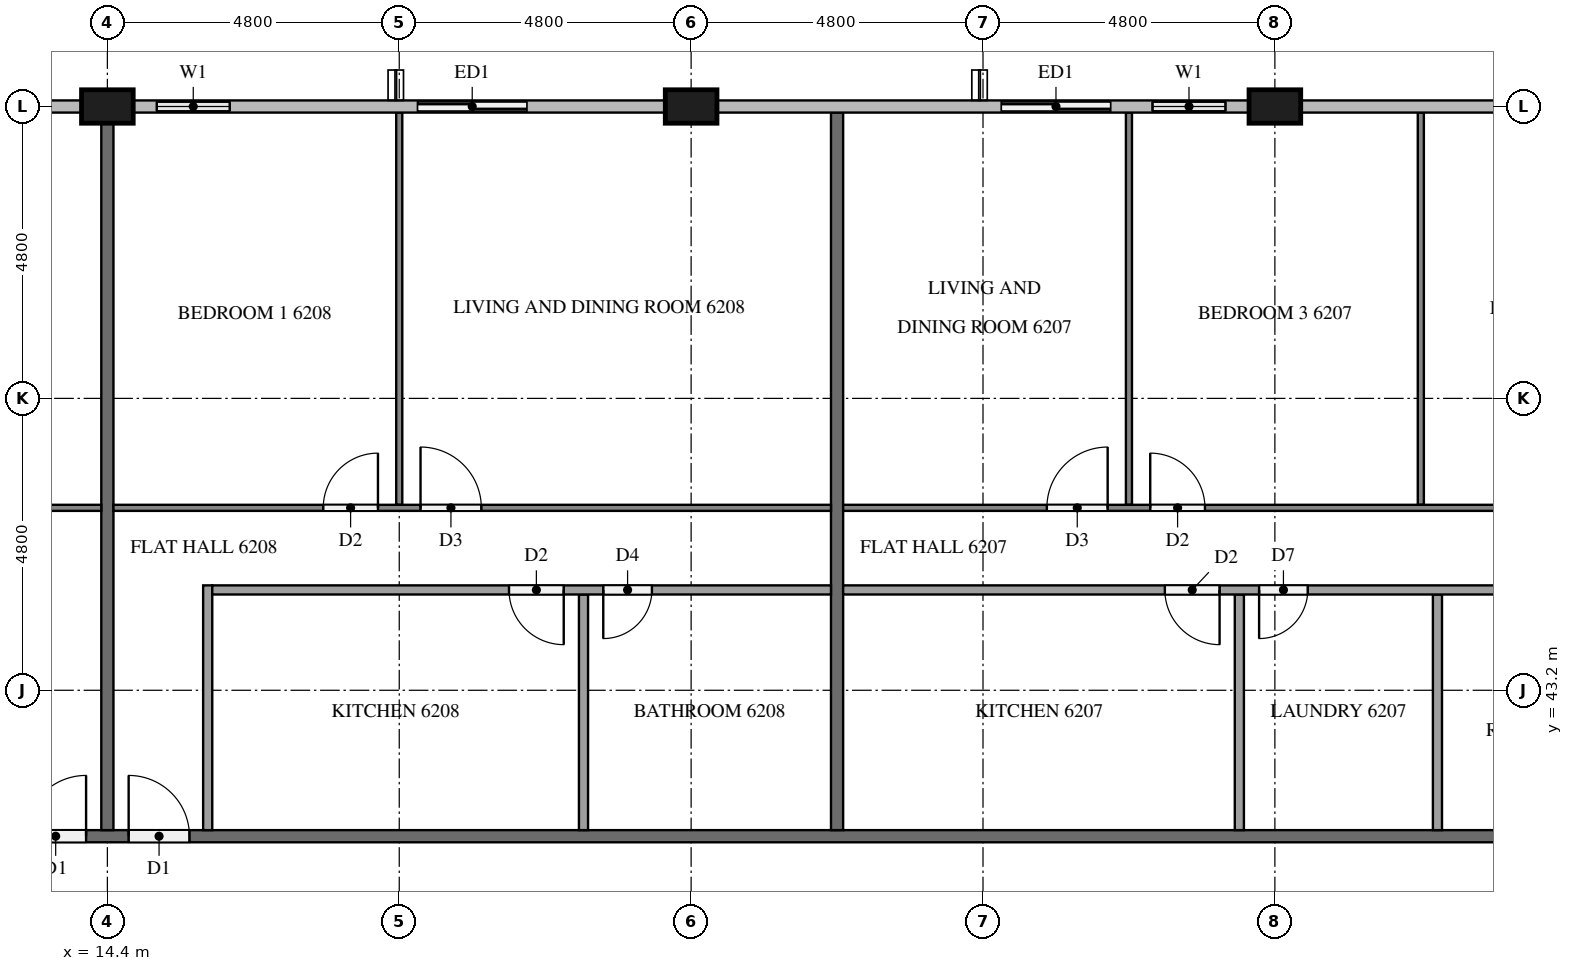
"""IFC4 building model, lengths in metres.
Left out: names, types, materials, properties, quantities, classifications, styles, units other than length and angle.
Written with IfcOpenShell. Run it as: python <this file> out.ifc"""

import sys

from ifc_helpers import new_model, si_unit, direction, frame, frame_2d, origin, origin_2d, place, context, subcontext, project, spatial, rectangle, extrude, element, fill, save


model = new_model("IFC4")
c1 = context("Model", 3, precision=1e-05, world=origin(), true_north=direction((0.0, 1.0)))
c2 = subcontext(c1, "Body", "Model", "MODEL_VIEW")
j1 = project(units=[si_unit("LENGTHUNIT", "METRE"), si_unit("PLANEANGLEUNIT", "RADIAN")], contexts=[c1])
p1 = place(None, origin())
s1 = spatial("IfcSite", under=j1, at=p1, CompositionType="ELEMENT")
p2 = place(p1, origin())
s2 = spatial("IfcBuilding", under=s1, at=p2, CompositionType="ELEMENT")
p3 = place(p2, frame((0.0, 0.0, 238.7)))
s3 = spatial("IfcBuildingStorey", under=s2, at=p3, CompositionType="ELEMENT", Elevation=238.7)
for number, where, z_axis, x_axis in (
    (1, (33.6, 52.8, 0.0), (0.0, 0.0, 1.0), (1.0, 0.0, 0.0)),
    (2, (24.0, 52.8, 0.0), (0.0, 0.0, 1.0), (1.0, 0.0, 0.0)),
    (3, (14.4, 52.8, 0.0), (0.0, 0.0, 1.0), (1.0, 0.0, 0.0)),
):
    element("IfcColumn", number, at=place(p3, frame(where, z_axis=z_axis, x_axis=x_axis)), inside=s3, PredefinedType="COLUMN", context=c2, shape_type="SweptSolid", body=[
        extrude(rectangle(XDim=0.85, YDim=0.55, at=origin_2d()), origin(), (0.0, 0.0, 1.0), 3.2),
    ])
p4 = place(p3, frame((33.175, 52.8, 0.0), z_axis=(0.0, 0.0, 1.0), x_axis=(-1.0, 0.0, 0.0)))
e4 = element("IfcWall", 4, at=p4, inside=s3, PredefinedType="SOLIDWALL", context=c2, shape_type="SweptSolid", body=[
    extrude(rectangle(XDim=4.375, YDim=0.15, at=frame_2d((2.188, 0.0))), origin(), (0.0, 0.0, 1.0), 3.2),
])
p5 = place(p4, frame((0.387, 0.0, 0.9)))
e5 = element("IfcOpeningElement", 5, at=p5, cuts=e4, PredefinedType="OPENING", context=c2, shape_type="SweptSolid", body=[
    extrude(rectangle(XDim=1.2, YDim=1.4, at=frame_2d((0.6, 0.7))), frame((0.0, 0.085, 0.0), z_axis=(0.0, -1.0, 0.0), x_axis=(1.0, 0.0, 0.0)), (0.0, 0.0, 1.0), 0.17),
])
p6 = place(p4, frame((2.275, 0.0, 0.0)))
e6 = element("IfcOpeningElement", 6, at=p6, cuts=e4, PredefinedType="OPENING", context=c2, shape_type="SweptSolid", body=[
    extrude(rectangle(XDim=1.8, YDim=2.4, at=frame_2d((0.9, 1.2))), frame((0.0, 0.085, 0.0), z_axis=(0.0, -1.0, 0.0), x_axis=(1.0, 0.0, 0.0)), (0.0, 0.0, 1.0), 0.17),
])
p7 = place(p3, frame((21.6, 52.8, 0.0), z_axis=(0.0, 0.0, 1.0), x_axis=(-1.0, 0.0, 0.0)))
e7 = element("IfcWall", 7, at=p7, inside=s3, PredefinedType="SOLIDWALL", context=c2, shape_type="SweptSolid", body=[
    extrude(rectangle(XDim=2.4, YDim=0.15, at=frame_2d((1.2, 0.0))), origin(), (0.0, 0.0, 1.0), 3.2),
])
p8 = place(p7, frame((0.3, 0.0, 0.0)))
e8 = element("IfcOpeningElement", 8, at=p8, cuts=e7, PredefinedType="OPENING", context=c2, shape_type="SweptSolid", body=[
    extrude(rectangle(XDim=1.8, YDim=2.4, at=frame_2d((0.9, 1.2))), frame((0.0, 0.085, 0.0), z_axis=(0.0, -1.0, 0.0), x_axis=(1.0, 0.0, 0.0)), (0.0, 0.0, 1.0), 0.17),
])
p9 = place(p3, frame((16.8, 52.8, 0.0), z_axis=(0.0, 0.0, 1.0), x_axis=(-1.0, 0.0, 0.0)))
e9 = element("IfcWall", 9, at=p9, inside=s3, PredefinedType="SOLIDWALL", context=c2, shape_type="SweptSolid", body=[
    extrude(rectangle(XDim=1.975, YDim=0.15, at=frame_2d((0.988, 0.0))), origin(), (0.0, 0.0, 1.0), 3.2),
])
p10 = place(p9, frame((0.387, 0.0, 0.9)))
e10 = element("IfcOpeningElement", 10, at=p10, cuts=e9, PredefinedType="OPENING", context=c2, shape_type="SweptSolid", body=[
    extrude(rectangle(XDim=1.2, YDim=1.4, at=frame_2d((0.6, 0.7))), frame((0.0, 0.085, 0.0), z_axis=(0.0, -1.0, 0.0), x_axis=(1.0, 0.0, 0.0)), (0.0, 0.0, 1.0), 0.17),
])
p11 = place(p3, frame((11.9, 40.8, 0.0), z_axis=(0.0, 0.0, 1.0), x_axis=(1.0, 0.0, 0.0)))
e11 = element("IfcWall", 11, at=p11, inside=s3, PredefinedType="PARTITIONING", context=c2, shape_type="SweptSolid", body=[
    extrude(rectangle(XDim=38.6, YDim=0.2, at=frame_2d((19.3, 0.0))), origin(), (0.0, 0.0, 1.0), 3.2),
])
p12 = place(p11, frame((34.05, 0.0, 0.0)))
e12 = element("IfcOpeningElement", 12, at=p12, cuts=e11, PredefinedType="OPENING", context=c2, shape_type="SweptSolid", body=[
    extrude(rectangle(XDim=1.0, YDim=2.1, at=frame_2d((0.5, 1.05))), frame((0.0, 0.11, 0.0), z_axis=(0.0, -1.0, 0.0), x_axis=(1.0, 0.0, 0.0)), (0.0, 0.0, 1.0), 0.22),
])
p13 = place(p11, frame((32.3, 0.0, 0.0)))
e13 = element("IfcOpeningElement", 13, at=p13, cuts=e11, PredefinedType="OPENING", context=c2, shape_type="SweptSolid", body=[
    extrude(rectangle(XDim=1.1, YDim=2.1, at=frame_2d((0.55, 1.05))), frame((0.0, 0.11, 0.0), z_axis=(0.0, -1.0, 0.0), x_axis=(1.0, 0.0, 0.0)), (0.0, 0.0, 1.0), 0.22),
])
p14 = place(p11, frame((2.85, 0.0, 0.0)))
e14 = element("IfcOpeningElement", 14, at=p14, cuts=e11, PredefinedType="OPENING", context=c2, shape_type="SweptSolid", body=[
    extrude(rectangle(XDim=1.0, YDim=2.1, at=frame_2d((0.5, 1.05))), frame((0.0, 0.11, 0.0), z_axis=(0.0, -1.0, 0.0), x_axis=(1.0, 0.0, 0.0)), (0.0, 0.0, 1.0), 0.22),
])
p15 = place(p11, frame((1.15, 0.0, 0.0)))
e15 = element("IfcOpeningElement", 15, at=p15, cuts=e11, PredefinedType="OPENING", context=c2, shape_type="SweptSolid", body=[
    extrude(rectangle(XDim=1.0, YDim=2.1, at=frame_2d((0.5, 1.05))), frame((0.0, 0.11, 0.0), z_axis=(0.0, -1.0, 0.0), x_axis=(1.0, 0.0, 0.0)), (0.0, 0.0, 1.0), 0.22),
])
p16 = place(p3, frame((26.4, 52.7, 0.0), z_axis=(0.0, 0.0, 1.0), x_axis=(0.0, -1.0, 0.0)))
e16 = element("IfcWall", 16, at=p16, inside=s3, PredefinedType="PARTITIONING", context=c2, shape_type="SweptSolid", body=[
    extrude(rectangle(XDim=11.8, YDim=0.2, at=frame_2d((5.9, 0.0))), origin(), (0.0, 0.0, 1.0), 3.2),
])
p17 = place(p3, frame((14.4, 52.525, 0.0), z_axis=(0.0, 0.0, 1.0), x_axis=(0.0, -1.0, 0.0)))
e17 = element("IfcWall", 17, at=p17, inside=s3, PredefinedType="PARTITIONING", context=c2, shape_type="SweptSolid", body=[
    extrude(rectangle(XDim=11.625, YDim=0.2, at=frame_2d((5.812, 0.0))), origin(), (0.0, 0.0, 1.0), 3.2),
])
for number, where, z_axis, x_axis in (
    (18, (36.0, 46.25, 0.0), (0.0, 0.0, 1.0), (0.0, 1.0, 0.0)),
    (19, (31.2, 46.25, 0.0), (0.0, 0.0, 1.0), (0.0, 1.0, 0.0)),
):
    element("IfcWall", number, at=place(p3, frame(where, z_axis=z_axis, x_axis=x_axis)), inside=s3, PredefinedType="PARTITIONING", context=c2, shape_type="SweptSolid", body=[
        extrude(rectangle(XDim=6.45, YDim=0.1, at=frame_2d((3.225, 0.0))), origin(), (0.0, 0.0, 1.0), 3.2),
    ])
p18 = place(p3, frame((26.5, 46.2, 0.0), z_axis=(0.0, 0.0, 1.0), x_axis=(1.0, 0.0, 0.0)))
e20 = element("IfcWall", 20, at=p18, inside=s3, PredefinedType="PARTITIONING", context=c2, shape_type="SweptSolid", body=[
    extrude(rectangle(XDim=19.0, YDim=0.1, at=frame_2d((9.5, 0.0))), origin(), (0.0, 0.0, 1.0), 3.2),
])
p19 = place(p18, frame((14.65, 0.0, 0.0)))
e21 = element("IfcOpeningElement", 21, at=p19, cuts=e20, PredefinedType="OPENING", context=c2, shape_type="SweptSolid", body=[
    extrude(rectangle(XDim=0.9, YDim=2.1, at=frame_2d((0.45, 1.05))), frame((0.0, 0.06, 0.0), z_axis=(0.0, -1.0, 0.0), x_axis=(1.0, 0.0, 0.0)), (0.0, 0.0, 1.0), 0.12),
])
p20 = place(p18, frame((13.05, 0.0, 0.0)))
e22 = element("IfcOpeningElement", 22, at=p20, cuts=e20, PredefinedType="OPENING", context=c2, shape_type="SweptSolid", body=[
    extrude(rectangle(XDim=0.9, YDim=2.1, at=frame_2d((0.45, 1.05))), frame((0.0, 0.06, 0.0), z_axis=(0.0, -1.0, 0.0), x_axis=(1.0, 0.0, 0.0)), (0.0, 0.0, 1.0), 0.12),
])
p21 = place(p18, frame((5.05, 0.0, 0.0)))
e23 = element("IfcOpeningElement", 23, at=p21, cuts=e20, PredefinedType="OPENING", context=c2, shape_type="SweptSolid", body=[
    extrude(rectangle(XDim=0.9, YDim=2.1, at=frame_2d((0.45, 1.05))), frame((0.0, 0.06, 0.0), z_axis=(0.0, -1.0, 0.0), x_axis=(1.0, 0.0, 0.0)), (0.0, 0.0, 1.0), 0.12),
])
p22 = place(p18, frame((3.35, 0.0, 0.0)))
e24 = element("IfcOpeningElement", 24, at=p22, cuts=e20, PredefinedType="OPENING", context=c2, shape_type="SweptSolid", body=[
    extrude(rectangle(XDim=1.0, YDim=2.1, at=frame_2d((0.5, 1.05))), frame((0.0, 0.06, 0.0), z_axis=(0.0, -1.0, 0.0), x_axis=(1.0, 0.0, 0.0)), (0.0, 0.0, 1.0), 0.12),
])
for number, where, z_axis, x_axis in (
    (25, (36.273, 40.9, 0.0), (0.0, 0.0, 1.0), (0.0, 1.0, 0.0)),
    (26, (33.016, 40.9, 0.0), (0.0, 0.0, 1.0), (0.0, 1.0, 0.0)),
):
    element("IfcWall", number, at=place(p3, frame(where, z_axis=z_axis, x_axis=x_axis)), inside=s3, PredefinedType="PARTITIONING", context=c2, shape_type="SweptSolid", body=[
        extrude(rectangle(XDim=3.875, YDim=0.15, at=frame_2d((1.938, 0.0))), origin(), (0.0, 0.0, 1.0), 3.2),
    ])
p23 = place(p3, frame((43.875, 44.85, 0.0), z_axis=(0.0, 0.0, 1.0), x_axis=(-1.0, 0.0, 0.0)))
e27 = element("IfcWall", 27, at=p23, inside=s3, PredefinedType="PARTITIONING", context=c2, shape_type="SweptSolid", body=[
    extrude(rectangle(XDim=17.375, YDim=0.15, at=frame_2d((8.688, 0.0))), origin(), (0.0, 0.0, 1.0), 3.2),
])
p24 = place(p23, frame((3.119, 0.0, 0.0)))
e28 = element("IfcOpeningElement", 28, at=p24, cuts=e27, PredefinedType="OPENING", context=c2, shape_type="SweptSolid", body=[
    extrude(rectangle(XDim=0.9, YDim=2.1, at=frame_2d((0.45, 1.05))), frame((0.0, 0.085, 0.0), z_axis=(0.0, -1.0, 0.0), x_axis=(1.0, 0.0, 0.0)), (0.0, 0.0, 1.0), 0.17),
])
p25 = place(p23, frame((4.669, 0.0, 0.0)))
e29 = element("IfcOpeningElement", 29, at=p25, cuts=e27, PredefinedType="OPENING", context=c2, shape_type="SweptSolid", body=[
    extrude(rectangle(XDim=0.8, YDim=2.1, at=frame_2d((0.4, 1.05))), frame((0.0, 0.085, 0.0), z_axis=(0.0, -1.0, 0.0), x_axis=(1.0, 0.0, 0.0)), (0.0, 0.0, 1.0), 0.17),
])
p26 = place(p23, frame((9.734, 0.0, 0.0)))
e30 = element("IfcOpeningElement", 30, at=p26, cuts=e27, PredefinedType="OPENING", context=c2, shape_type="SweptSolid", body=[
    extrude(rectangle(XDim=0.8, YDim=2.1, at=frame_2d((0.4, 1.05))), frame((0.0, 0.085, 0.0), z_axis=(0.0, -1.0, 0.0), x_axis=(1.0, 0.0, 0.0)), (0.0, 0.0, 1.0), 0.17),
])
p27 = place(p23, frame((11.184, 0.0, 0.0)))
e31 = element("IfcOpeningElement", 31, at=p27, cuts=e27, PredefinedType="OPENING", context=c2, shape_type="SweptSolid", body=[
    extrude(rectangle(XDim=0.9, YDim=2.1, at=frame_2d((0.45, 1.05))), frame((0.0, 0.085, 0.0), z_axis=(0.0, -1.0, 0.0), x_axis=(1.0, 0.0, 0.0)), (0.0, 0.0, 1.0), 0.17),
])
p28 = place(p3, frame((19.2, 46.25, 0.0), z_axis=(0.0, 0.0, 1.0), x_axis=(0.0, 1.0, 0.0)))
e32 = element("IfcWall", 32, at=p28, inside=s3, PredefinedType="PARTITIONING", context=c2, shape_type="SweptSolid", body=[
    extrude(rectangle(XDim=6.45, YDim=0.1, at=frame_2d((3.225, 0.0))), origin(), (0.0, 0.0, 1.0), 3.2),
])
p29 = place(p3, frame((14.5, 46.2, 0.0), z_axis=(0.0, 0.0, 1.0), x_axis=(1.0, 0.0, 0.0)))
e33 = element("IfcWall", 33, at=p29, inside=s3, PredefinedType="PARTITIONING", context=c2, shape_type="SweptSolid", body=[
    extrude(rectangle(XDim=11.8, YDim=0.1, at=frame_2d((5.9, 0.0))), origin(), (0.0, 0.0, 1.0), 3.2),
])
p30 = place(p29, frame((3.45, 0.0, 0.0)))
e34 = element("IfcOpeningElement", 34, at=p30, cuts=e33, PredefinedType="OPENING", context=c2, shape_type="SweptSolid", body=[
    extrude(rectangle(XDim=0.9, YDim=2.1, at=frame_2d((0.45, 1.05))), frame((0.0, 0.06, 0.0), z_axis=(0.0, -1.0, 0.0), x_axis=(1.0, 0.0, 0.0)), (0.0, 0.0, 1.0), 0.12),
])
p31 = place(p29, frame((5.05, 0.0, 0.0)))
e35 = element("IfcOpeningElement", 35, at=p31, cuts=e33, PredefinedType="OPENING", context=c2, shape_type="SweptSolid", body=[
    extrude(rectangle(XDim=1.0, YDim=2.1, at=frame_2d((0.5, 1.05))), frame((0.0, 0.06, 0.0), z_axis=(0.0, -1.0, 0.0), x_axis=(1.0, 0.0, 0.0)), (0.0, 0.0, 1.0), 0.12),
])
p32 = place(p3, frame((22.23, 40.9, 0.0), z_axis=(0.0, 0.0, 1.0), x_axis=(0.0, 1.0, 0.0)))
e36 = element("IfcWall", 36, at=p32, inside=s3, PredefinedType="PARTITIONING", context=c2, shape_type="SweptSolid", body=[
    extrude(rectangle(XDim=3.875, YDim=0.15, at=frame_2d((1.938, 0.0))), origin(), (0.0, 0.0, 1.0), 3.2),
])
p33 = place(p3, frame((16.05, 40.9, 0.0), z_axis=(0.0, 0.0, 1.0), x_axis=(0.0, 1.0, 0.0)))
e37 = element("IfcWall", 37, at=p33, inside=s3, PredefinedType="PARTITIONING", context=c2, shape_type="SweptSolid", body=[
    extrude(rectangle(XDim=4.025, YDim=0.15, at=frame_2d((2.013, 0.0))), origin(), (0.0, 0.0, 1.0), 3.2),
])
p34 = place(p3, frame((26.3, 44.85, 0.0), z_axis=(0.0, 0.0, 1.0), x_axis=(-1.0, 0.0, 0.0)))
e38 = element("IfcWall", 38, at=p34, inside=s3, PredefinedType="PARTITIONING", context=c2, shape_type="SweptSolid", body=[
    extrude(rectangle(XDim=10.175, YDim=0.15, at=frame_2d((5.087, 0.0))), origin(), (0.0, 0.0, 1.0), 3.2),
])
p35 = place(p34, frame((4.395, 0.0, 0.0)))
e39 = element("IfcOpeningElement", 39, at=p35, cuts=e38, PredefinedType="OPENING", context=c2, shape_type="SweptSolid", body=[
    extrude(rectangle(XDim=0.9, YDim=2.1, at=frame_2d((0.45, 1.05))), frame((0.0, 0.085, 0.0), z_axis=(0.0, -1.0, 0.0), x_axis=(1.0, 0.0, 0.0)), (0.0, 0.0, 1.0), 0.17),
])
p36 = place(p34, frame((2.945, 0.0, 0.0)))
e40 = element("IfcOpeningElement", 40, at=p36, cuts=e38, PredefinedType="OPENING", context=c2, shape_type="SweptSolid", body=[
    extrude(rectangle(XDim=0.8, YDim=2.1, at=frame_2d((0.4, 1.05))), frame((0.0, 0.085, 0.0), z_axis=(0.0, -1.0, 0.0), x_axis=(1.0, 0.0, 0.0)), (0.0, 0.0, 1.0), 0.17),
])
p37 = place(p3, frame((0.1, 46.2, 0.0), z_axis=(0.0, 0.0, 1.0), x_axis=(1.0, 0.0, 0.0)))
e41 = element("IfcWall", 41, at=p37, inside=s3, PredefinedType="PARTITIONING", context=c2, shape_type="SweptSolid", body=[
    extrude(rectangle(XDim=14.2, YDim=0.1, at=frame_2d((7.1, 0.0))), origin(), (0.0, 0.0, 1.0), 3.2),
])
p38 = place(p37, frame((9.85, 0.0, 0.0)))
e42 = element("IfcOpeningElement", 42, at=p38, cuts=e41, PredefinedType="OPENING", context=c2, shape_type="SweptSolid", body=[
    extrude(rectangle(XDim=1.0, YDim=2.1, at=frame_2d((0.5, 1.05))), frame((0.0, 0.06, 0.0), z_axis=(0.0, -1.0, 0.0), x_axis=(1.0, 0.0, 0.0)), (0.0, 0.0, 1.0), 0.12),
])
p39 = place(p37, frame((8.25, 0.0, 0.0)))
e43 = element("IfcOpeningElement", 43, at=p39, cuts=e41, PredefinedType="OPENING", context=c2, shape_type="SweptSolid", body=[
    extrude(rectangle(XDim=0.9, YDim=2.1, at=frame_2d((0.45, 1.05))), frame((0.0, 0.06, 0.0), z_axis=(0.0, -1.0, 0.0), x_axis=(1.0, 0.0, 0.0)), (0.0, 0.0, 1.0), 0.12),
])
p40 = place(p37, frame((0.3, 0.0, 0.0)))
e44 = element("IfcOpeningElement", 44, at=p40, cuts=e41, PredefinedType="OPENING", context=c2, shape_type="SweptSolid", body=[
    extrude(rectangle(XDim=0.9, YDim=2.1, at=frame_2d((0.45, 1.05))), frame((0.0, 0.06, 0.0), z_axis=(0.0, -1.0, 0.0), x_axis=(1.0, 0.0, 0.0)), (0.0, 0.0, 1.0), 0.12),
])
p41 = place(p5, origin())
e45 = element("IfcWindow", 45, at=p41, inside=s3, PartitioningType="SINGLE_PANEL", PredefinedType="WINDOW", context=c2, shape_type="SweptSolid", body=[
    extrude(rectangle(XDim=1.2, YDim=1.4, at=frame_2d((0.6, 0.7))), frame((0.0, 0.03, 0.0), z_axis=(0.0, -1.0, 0.0), x_axis=(1.0, 0.0, 0.0)), (0.0, 0.0, 1.0), 0.06),
])
fill(e5, e45)
p42 = place(p6, origin())
e46 = element("IfcDoor", 46, at=p42, inside=s3, OperationType="SLIDING_TO_RIGHT", PredefinedType="DOOR", context=c2, shape_type="SweptSolid", body=[
    extrude(rectangle(XDim=1.8, YDim=2.4, at=frame_2d((0.9, 1.2))), frame((0.0, 0.025, 0.0), z_axis=(0.0, -1.0, 0.0), x_axis=(1.0, 0.0, 0.0)), (0.0, 0.0, 1.0), 0.05),
])
fill(e6, e46)
p43 = place(p8, origin())
e47 = element("IfcDoor", 47, at=p43, inside=s3, OperationType="SLIDING_TO_LEFT", PredefinedType="DOOR", context=c2, shape_type="SweptSolid", body=[
    extrude(rectangle(XDim=1.8, YDim=2.4, at=frame_2d((0.9, 1.2))), frame((0.0, 0.025, 0.0), z_axis=(0.0, -1.0, 0.0), x_axis=(1.0, 0.0, 0.0)), (0.0, 0.0, 1.0), 0.05),
])
fill(e8, e47)
p44 = place(p10, origin())
e48 = element("IfcWindow", 48, at=p44, inside=s3, PartitioningType="SINGLE_PANEL", PredefinedType="WINDOW", context=c2, shape_type="SweptSolid", body=[
    extrude(rectangle(XDim=1.2, YDim=1.4, at=frame_2d((0.6, 0.7))), frame((0.0, 0.03, 0.0), z_axis=(0.0, -1.0, 0.0), x_axis=(1.0, 0.0, 0.0)), (0.0, 0.0, 1.0), 0.06),
])
fill(e10, e48)
p45 = place(p14, origin())
e49 = element("IfcDoor", 49, at=p45, inside=s3, OperationType="SINGLE_SWING_LEFT", PredefinedType="DOOR", context=c2, shape_type="SweptSolid", body=[
    extrude(rectangle(XDim=1.0, YDim=2.1, at=frame_2d((0.5, 1.05))), frame((0.0, 0.025, 0.0), z_axis=(0.0, -1.0, 0.0), x_axis=(1.0, 0.0, 0.0)), (0.0, 0.0, 1.0), 0.05),
])
fill(e14, e49)
p46 = place(p15, origin())
e50 = element("IfcDoor", 50, at=p46, inside=s3, OperationType="SINGLE_SWING_RIGHT", PredefinedType="DOOR", context=c2, shape_type="SweptSolid", body=[
    extrude(rectangle(XDim=1.0, YDim=2.1, at=frame_2d((0.5, 1.05))), frame((0.0, 0.025, 0.0), z_axis=(0.0, -1.0, 0.0), x_axis=(1.0, 0.0, 0.0)), (0.0, 0.0, 1.0), 0.05),
])
fill(e15, e50)
p47 = place(p21, origin())
e51 = element("IfcDoor", 51, at=p47, inside=s3, OperationType="SINGLE_SWING_LEFT", PredefinedType="DOOR", context=c2, shape_type="SweptSolid", body=[
    extrude(rectangle(XDim=0.9, YDim=2.1, at=frame_2d((0.45, 1.05))), frame((0.0, 0.025, 0.0), z_axis=(0.0, -1.0, 0.0), x_axis=(1.0, 0.0, 0.0)), (0.0, 0.0, 1.0), 0.05),
])
fill(e23, e51)
p48 = place(p22, origin())
e52 = element("IfcDoor", 52, at=p48, inside=s3, OperationType="SINGLE_SWING_RIGHT", PredefinedType="DOOR", context=c2, shape_type="SweptSolid", body=[
    extrude(rectangle(XDim=1.0, YDim=2.1, at=frame_2d((0.5, 1.05))), frame((0.0, 0.025, 0.0), z_axis=(0.0, -1.0, 0.0), x_axis=(1.0, 0.0, 0.0)), (0.0, 0.0, 1.0), 0.05),
])
fill(e24, e52)
p49 = place(p26, origin())
e53 = element("IfcDoor", 53, at=p49, inside=s3, OperationType="SINGLE_SWING_RIGHT", PredefinedType="DOOR", context=c2, shape_type="SweptSolid", body=[
    extrude(rectangle(XDim=0.8, YDim=2.1, at=frame_2d((0.4, 1.05))), frame((0.0, 0.025, 0.0), z_axis=(0.0, -1.0, 0.0), x_axis=(1.0, 0.0, 0.0)), (0.0, 0.0, 1.0), 0.05),
])
fill(e30, e53)
p50 = place(p27, origin())
e54 = element("IfcDoor", 54, at=p50, inside=s3, OperationType="SINGLE_SWING_LEFT", PredefinedType="DOOR", context=c2, shape_type="SweptSolid", body=[
    extrude(rectangle(XDim=0.9, YDim=2.1, at=frame_2d((0.45, 1.05))), frame((0.0, 0.025, 0.0), z_axis=(0.0, -1.0, 0.0), x_axis=(1.0, 0.0, 0.0)), (0.0, 0.0, 1.0), 0.05),
])
fill(e31, e54)
p51 = place(p30, origin())
e55 = element("IfcDoor", 55, at=p51, inside=s3, OperationType="SINGLE_SWING_RIGHT", PredefinedType="DOOR", context=c2, shape_type="SweptSolid", body=[
    extrude(rectangle(XDim=0.9, YDim=2.1, at=frame_2d((0.45, 1.05))), frame((0.0, 0.025, 0.0), z_axis=(0.0, -1.0, 0.0), x_axis=(1.0, 0.0, 0.0)), (0.0, 0.0, 1.0), 0.05),
])
fill(e34, e55)
p52 = place(p31, origin())
e56 = element("IfcDoor", 56, at=p52, inside=s3, OperationType="SINGLE_SWING_LEFT", PredefinedType="DOOR", context=c2, shape_type="SweptSolid", body=[
    extrude(rectangle(XDim=1.0, YDim=2.1, at=frame_2d((0.5, 1.05))), frame((0.0, 0.025, 0.0), z_axis=(0.0, -1.0, 0.0), x_axis=(1.0, 0.0, 0.0)), (0.0, 0.0, 1.0), 0.05),
])
fill(e35, e56)
p53 = place(p35, origin())
e57 = element("IfcDoor", 57, at=p53, inside=s3, OperationType="SINGLE_SWING_LEFT", PredefinedType="DOOR", context=c2, shape_type="SweptSolid", body=[
    extrude(rectangle(XDim=0.9, YDim=2.1, at=frame_2d((0.45, 1.05))), frame((0.0, 0.025, 0.0), z_axis=(0.0, -1.0, 0.0), x_axis=(1.0, 0.0, 0.0)), (0.0, 0.0, 1.0), 0.05),
])
fill(e39, e57)
p54 = place(p36, origin())
e58 = element("IfcDoor", 58, at=p54, inside=s3, OperationType="SINGLE_SWING_RIGHT", PredefinedType="DOOR", context=c2, shape_type="SweptSolid", body=[
    extrude(rectangle(XDim=0.8, YDim=2.1, at=frame_2d((0.4, 1.05))), frame((0.0, 0.025, 0.0), z_axis=(0.0, -1.0, 0.0), x_axis=(1.0, 0.0, 0.0)), (0.0, 0.0, 1.0), 0.05),
])
fill(e40, e58)
save(model, sys.argv[1])
